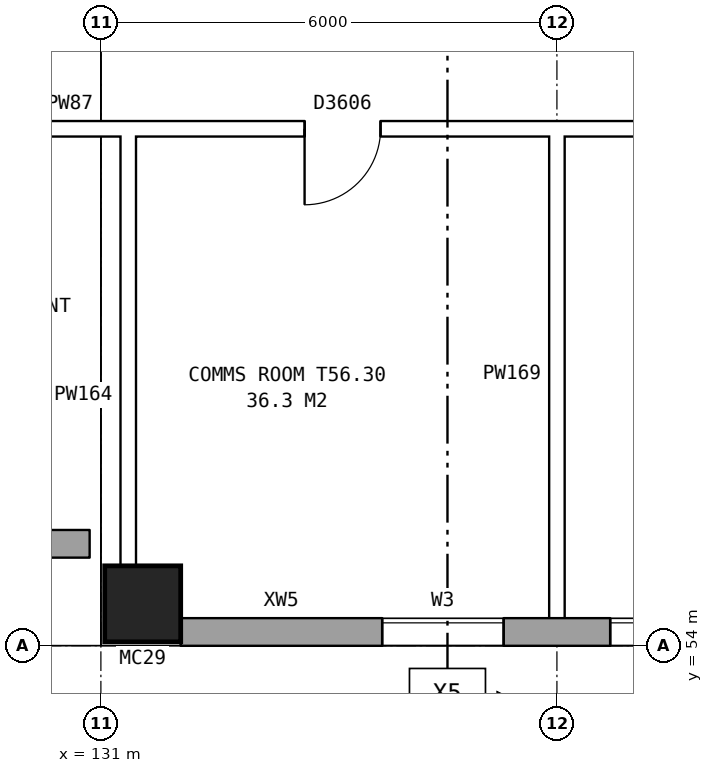
"""IFC4 building model, lengths in metres.
Left out: names, types, materials, properties, quantities, classifications, styles, units other than length and angle.
Written with IfcOpenShell. Run it as: python <this file> out.ifc"""

import sys

from ifc_helpers import new_model, si_unit, direction, frame, frame_2d, origin, origin_2d, place, context, subcontext, project, spatial, rectangle, hollow_rectangle, extrude, element, fill, save


model = new_model("IFC4")
c1 = context("Model", 3, precision=1e-05, world=origin(), true_north=direction((0.0, 1.0)))
c2 = subcontext(c1, "Body", "Model", "MODEL_VIEW")
j1 = project(units=[si_unit("LENGTHUNIT", "METRE"), si_unit("PLANEANGLEUNIT", "RADIAN")], contexts=[c1])
p1 = place(None, origin())
s1 = spatial("IfcSite", under=j1, at=p1, CompositionType="ELEMENT")
p2 = place(p1, origin())
s2 = spatial("IfcBuilding", under=s1, at=p2, CompositionType="ELEMENT")
p3 = place(p2, frame((0.0, 0.0, 198.6)))
s3 = spatial("IfcBuildingStorey", under=s2, at=p3, CompositionType="ELEMENT", Elevation=198.6)
p4 = place(p3, frame((131.55, 54.55, 0.0), z_axis=(0.0, 0.0, 1.0), x_axis=(1.0, 0.0, 0.0)))
e1 = element("IfcColumn", 1, at=p4, inside=s3, PredefinedType="COLUMN", context=c2, shape_type="SweptSolid", body=[
    extrude(hollow_rectangle(XDim=1.0, YDim=1.0, WallThickness=0.055, at=origin_2d()), origin(), (0.0, 0.0, 1.0), 4.2),
])
p5 = place(p3, frame((76.15, 55.34, 0.0), z_axis=(0.0, 0.0, 1.0), x_axis=(1.0, 0.0, 0.0)))
e2 = element("IfcWall", 2, at=p5, inside=s3, PredefinedType="STANDARD", context=c2, shape_type="SweptSolid", body=[
    extrude(rectangle(XDim=54.7, YDim=0.36, at=frame_2d((27.35, 0.0))), origin(), (0.0, 0.0, 1.0), 3.7),
])
p6 = place(p5, frame((1.75, 0.0, 1.5)))
e3 = element("IfcOpeningElement", 3, at=p6, cuts=e2, PredefinedType="OPENING", context=c2, shape_type="SweptSolid", body=[
    extrude(rectangle(XDim=0.6, YDim=1.2, at=frame_2d((0.3, 0.6))), frame((0.0, 0.19, 0.0), z_axis=(0.0, -1.0, 0.0), x_axis=(1.0, 0.0, 0.0)), (0.0, 0.0, 1.0), 0.38),
])
p7 = place(p5, frame((4.206, 0.0, 1.5)))
e4 = element("IfcOpeningElement", 4, at=p7, cuts=e2, PredefinedType="OPENING", context=c2, shape_type="SweptSolid", body=[
    extrude(rectangle(XDim=1.6, YDim=1.2, at=frame_2d((0.8, 0.6))), frame((0.0, 0.19, 0.0), z_axis=(0.0, -1.0, 0.0), x_axis=(1.0, 0.0, 0.0)), (0.0, 0.0, 1.0), 0.38),
])
p8 = place(p5, frame((8.625, 0.0, 1.5)))
e5 = element("IfcOpeningElement", 5, at=p8, cuts=e2, PredefinedType="OPENING", context=c2, shape_type="SweptSolid", body=[
    extrude(rectangle(XDim=0.6, YDim=1.2, at=frame_2d((0.3, 0.6))), frame((0.0, 0.19, 0.0), z_axis=(0.0, -1.0, 0.0), x_axis=(1.0, 0.0, 0.0)), (0.0, 0.0, 1.0), 0.38),
])
p9 = place(p5, frame((11.081, 0.0, 1.5)))
e6 = element("IfcOpeningElement", 6, at=p9, cuts=e2, PredefinedType="OPENING", context=c2, shape_type="SweptSolid", body=[
    extrude(rectangle(XDim=1.6, YDim=1.2, at=frame_2d((0.8, 0.6))), frame((0.0, 0.19, 0.0), z_axis=(0.0, -1.0, 0.0), x_axis=(1.0, 0.0, 0.0)), (0.0, 0.0, 1.0), 0.38),
])
p10 = place(p5, frame((9.525, 0.0, 1.5)))
e7 = element("IfcOpeningElement", 7, at=p10, cuts=e2, PredefinedType="OPENING", context=c2, shape_type="SweptSolid", body=[
    extrude(rectangle(XDim=1.2, YDim=1.2, at=frame_2d((0.6, 0.6))), frame((0.0, 0.19, 0.0), z_axis=(0.0, -1.0, 0.0), x_axis=(1.0, 0.0, 0.0)), (0.0, 0.0, 1.0), 0.38),
])
p11 = place(p5, frame((17.956, 0.0, 1.5)))
e8 = element("IfcOpeningElement", 8, at=p11, cuts=e2, PredefinedType="OPENING", context=c2, shape_type="SweptSolid", body=[
    extrude(rectangle(XDim=1.6, YDim=1.2, at=frame_2d((0.8, 0.6))), frame((0.0, 0.19, 0.0), z_axis=(0.0, -1.0, 0.0), x_axis=(1.0, 0.0, 0.0)), (0.0, 0.0, 1.0), 0.38),
])
p12 = place(p5, frame((22.375, 0.0, 1.5)))
e9 = element("IfcOpeningElement", 9, at=p12, cuts=e2, PredefinedType="OPENING", context=c2, shape_type="SweptSolid", body=[
    extrude(rectangle(XDim=1.6, YDim=1.2, at=frame_2d((0.8, 0.6))), frame((0.0, 0.19, 0.0), z_axis=(0.0, -1.0, 0.0), x_axis=(1.0, 0.0, 0.0)), (0.0, 0.0, 1.0), 0.38),
])
p13 = place(p5, frame((24.831, 0.0, 1.5)))
e10 = element("IfcOpeningElement", 10, at=p13, cuts=e2, PredefinedType="OPENING", context=c2, shape_type="SweptSolid", body=[
    extrude(rectangle(XDim=1.6, YDim=1.2, at=frame_2d((0.8, 0.6))), frame((0.0, 0.19, 0.0), z_axis=(0.0, -1.0, 0.0), x_axis=(1.0, 0.0, 0.0)), (0.0, 0.0, 1.0), 0.38),
])
p14 = place(p5, frame((28.269, 0.0, 1.5)))
e11 = element("IfcOpeningElement", 11, at=p14, cuts=e2, PredefinedType="OPENING", context=c2, shape_type="SweptSolid", body=[
    extrude(rectangle(XDim=1.6, YDim=1.2, at=frame_2d((0.8, 0.6))), frame((0.0, 0.19, 0.0), z_axis=(0.0, -1.0, 0.0), x_axis=(1.0, 0.0, 0.0)), (0.0, 0.0, 1.0), 0.38),
])
p15 = place(p5, frame((26.775, 0.0, 1.5)))
e12 = element("IfcOpeningElement", 12, at=p15, cuts=e2, PredefinedType="OPENING", context=c2, shape_type="SweptSolid", body=[
    extrude(rectangle(XDim=0.9, YDim=1.2, at=frame_2d((0.45, 0.6))), frame((0.0, 0.19, 0.0), z_axis=(0.0, -1.0, 0.0), x_axis=(1.0, 0.0, 0.0)), (0.0, 0.0, 1.0), 0.38),
])
p16 = place(p5, frame((35.144, 0.0, 1.5)))
e13 = element("IfcOpeningElement", 13, at=p16, cuts=e2, PredefinedType="OPENING", context=c2, shape_type="SweptSolid", body=[
    extrude(rectangle(XDim=1.6, YDim=1.2, at=frame_2d((0.8, 0.6))), frame((0.0, 0.19, 0.0), z_axis=(0.0, -1.0, 0.0), x_axis=(1.0, 0.0, 0.0)), (0.0, 0.0, 1.0), 0.38),
])
p17 = place(p5, frame((37.075, 0.0, 1.5)))
e14 = element("IfcOpeningElement", 14, at=p17, cuts=e2, PredefinedType="OPENING", context=c2, shape_type="SweptSolid", body=[
    extrude(rectangle(XDim=0.6, YDim=1.2, at=frame_2d((0.3, 0.6))), frame((0.0, 0.19, 0.0), z_axis=(0.0, -1.0, 0.0), x_axis=(1.0, 0.0, 0.0)), (0.0, 0.0, 1.0), 0.38),
])
p18 = place(p5, frame((42.019, 0.0, 1.5)))
e15 = element("IfcOpeningElement", 15, at=p18, cuts=e2, PredefinedType="OPENING", context=c2, shape_type="SweptSolid", body=[
    extrude(rectangle(XDim=1.6, YDim=1.2, at=frame_2d((0.8, 0.6))), frame((0.0, 0.19, 0.0), z_axis=(0.0, -1.0, 0.0), x_axis=(1.0, 0.0, 0.0)), (0.0, 0.0, 1.0), 0.38),
])
p19 = place(p5, frame((37.975, 0.0, 1.5)))
e16 = element("IfcOpeningElement", 16, at=p19, cuts=e2, PredefinedType="OPENING", context=c2, shape_type="SweptSolid", body=[
    extrude(rectangle(XDim=1.2, YDim=1.2, at=frame_2d((0.6, 0.6))), frame((0.0, 0.19, 0.0), z_axis=(0.0, -1.0, 0.0), x_axis=(1.0, 0.0, 0.0)), (0.0, 0.0, 1.0), 0.38),
])
p20 = place(p5, frame((48.894, 0.0, 1.5)))
e17 = element("IfcOpeningElement", 17, at=p20, cuts=e2, PredefinedType="OPENING", context=c2, shape_type="SweptSolid", body=[
    extrude(rectangle(XDim=1.6, YDim=1.2, at=frame_2d((0.8, 0.6))), frame((0.0, 0.19, 0.0), z_axis=(0.0, -1.0, 0.0), x_axis=(1.0, 0.0, 0.0)), (0.0, 0.0, 1.0), 0.38),
])
p21 = place(p5, frame((50.825, 0.0, 1.5)))
e18 = element("IfcOpeningElement", 18, at=p21, cuts=e2, PredefinedType="OPENING", context=c2, shape_type="SweptSolid", body=[
    extrude(rectangle(XDim=0.6, YDim=1.2, at=frame_2d((0.3, 0.6))), frame((0.0, 0.19, 0.0), z_axis=(0.0, -1.0, 0.0), x_axis=(1.0, 0.0, 0.0)), (0.0, 0.0, 1.0), 0.38),
])
p22 = place(p5, frame((2.65, 0.0, 1.5)))
e19 = element("IfcOpeningElement", 19, at=p22, cuts=e2, PredefinedType="OPENING", context=c2, shape_type="SweptSolid", body=[
    extrude(rectangle(XDim=1.2, YDim=1.2, at=frame_2d((0.6, 0.6))), frame((0.0, 0.19, 0.0), z_axis=(0.0, -1.0, 0.0), x_axis=(1.0, 0.0, 0.0)), (0.0, 0.0, 1.0), 0.38),
])
p23 = place(p5, frame((13.025, 0.0, 1.5)))
e20 = element("IfcOpeningElement", 20, at=p23, cuts=e2, PredefinedType="OPENING", context=c2, shape_type="SweptSolid", body=[
    extrude(rectangle(XDim=0.6, YDim=1.2, at=frame_2d((0.3, 0.6))), frame((0.0, 0.19, 0.0), z_axis=(0.0, -1.0, 0.0), x_axis=(1.0, 0.0, 0.0)), (0.0, 0.0, 1.0), 0.38),
])
p24 = place(p5, frame((15.475, 0.0, 1.5)))
e21 = element("IfcOpeningElement", 21, at=p24, cuts=e2, PredefinedType="OPENING", context=c2, shape_type="SweptSolid", body=[
    extrude(rectangle(XDim=1.6, YDim=1.2, at=frame_2d((0.8, 0.6))), frame((0.0, 0.19, 0.0), z_axis=(0.0, -1.0, 0.0), x_axis=(1.0, 0.0, 0.0)), (0.0, 0.0, 1.0), 0.38),
])
p25 = place(p5, frame((30.175, 0.0, 1.5)))
e22 = element("IfcOpeningElement", 22, at=p25, cuts=e2, PredefinedType="OPENING", context=c2, shape_type="SweptSolid", body=[
    extrude(rectangle(XDim=1.6, YDim=1.2, at=frame_2d((0.8, 0.6))), frame((0.0, 0.19, 0.0), z_axis=(0.0, -1.0, 0.0), x_axis=(1.0, 0.0, 0.0)), (0.0, 0.0, 1.0), 0.38),
])
p26 = place(p5, frame((41.075, 0.0, 1.5)))
e23 = element("IfcOpeningElement", 23, at=p26, cuts=e2, PredefinedType="OPENING", context=c2, shape_type="SweptSolid", body=[
    extrude(rectangle(XDim=0.6, YDim=1.2, at=frame_2d((0.3, 0.6))), frame((0.0, 0.19, 0.0), z_axis=(0.0, -1.0, 0.0), x_axis=(1.0, 0.0, 0.0)), (0.0, 0.0, 1.0), 0.38),
])
p27 = place(p5, frame((43.925, 0.0, 1.5)))
e24 = element("IfcOpeningElement", 24, at=p27, cuts=e2, PredefinedType="OPENING", context=c2, shape_type="SweptSolid", body=[
    extrude(rectangle(XDim=1.6, YDim=1.2, at=frame_2d((0.8, 0.6))), frame((0.0, 0.19, 0.0), z_axis=(0.0, -1.0, 0.0), x_axis=(1.0, 0.0, 0.0)), (0.0, 0.0, 1.0), 0.38),
])
p28 = place(p5, frame((51.725, 0.0, 1.5)))
e25 = element("IfcOpeningElement", 25, at=p28, cuts=e2, PredefinedType="OPENING", context=c2, shape_type="SweptSolid", body=[
    extrude(rectangle(XDim=1.2, YDim=1.2, at=frame_2d((0.6, 0.6))), frame((0.0, 0.19, 0.0), z_axis=(0.0, -1.0, 0.0), x_axis=(1.0, 0.0, 0.0)), (0.0, 0.0, 1.0), 0.38),
])
p29 = place(p3, frame((132.05, 54.18, 0.0), z_axis=(0.0, 0.0, 1.0), x_axis=(1.0, 0.0, 0.0)))
e26 = element("IfcWall", 26, at=p29, inside=s3, PredefinedType="STANDARD", context=c2, shape_type="SweptSolid", body=[
    extrude(rectangle(XDim=33.875, YDim=0.36, at=frame_2d((16.938, 0.0))), origin(), (0.0, 0.0, 1.0), 3.7),
])
p30 = place(p29, frame((2.65, 0.0, 1.5)))
e27 = element("IfcOpeningElement", 27, at=p30, cuts=e26, PredefinedType="OPENING", context=c2, shape_type="SweptSolid", body=[
    extrude(rectangle(XDim=1.6, YDim=1.2, at=frame_2d((0.8, 0.6))), frame((0.0, 0.19, 0.0), z_axis=(0.0, -1.0, 0.0), x_axis=(1.0, 0.0, 0.0)), (0.0, 0.0, 1.0), 0.38),
])
p31 = place(p29, frame((5.65, 0.0, 1.5)))
e28 = element("IfcOpeningElement", 28, at=p31, cuts=e26, PredefinedType="OPENING", context=c2, shape_type="SweptSolid", body=[
    extrude(rectangle(XDim=1.6, YDim=1.2, at=frame_2d((0.8, 0.6))), frame((0.0, 0.19, 0.0), z_axis=(0.0, -1.0, 0.0), x_axis=(1.0, 0.0, 0.0)), (0.0, 0.0, 1.0), 0.38),
])
p32 = place(p29, frame((8.65, 0.0, 1.5)))
e29 = element("IfcOpeningElement", 29, at=p32, cuts=e26, PredefinedType="OPENING", context=c2, shape_type="SweptSolid", body=[
    extrude(rectangle(XDim=1.6, YDim=1.2, at=frame_2d((0.8, 0.6))), frame((0.0, 0.19, 0.0), z_axis=(0.0, -1.0, 0.0), x_axis=(1.0, 0.0, 0.0)), (0.0, 0.0, 1.0), 0.38),
])
p33 = place(p29, frame((11.65, 0.0, 1.5)))
e30 = element("IfcOpeningElement", 30, at=p33, cuts=e26, PredefinedType="OPENING", context=c2, shape_type="SweptSolid", body=[
    extrude(rectangle(XDim=1.6, YDim=1.2, at=frame_2d((0.8, 0.6))), frame((0.0, 0.19, 0.0), z_axis=(0.0, -1.0, 0.0), x_axis=(1.0, 0.0, 0.0)), (0.0, 0.0, 1.0), 0.38),
])
p34 = place(p29, frame((14.65, 0.0, 1.5)))
e31 = element("IfcOpeningElement", 31, at=p34, cuts=e26, PredefinedType="OPENING", context=c2, shape_type="SweptSolid", body=[
    extrude(rectangle(XDim=1.6, YDim=1.2, at=frame_2d((0.8, 0.6))), frame((0.0, 0.19, 0.0), z_axis=(0.0, -1.0, 0.0), x_axis=(1.0, 0.0, 0.0)), (0.0, 0.0, 1.0), 0.38),
])
p35 = place(p29, frame((17.65, 0.0, 1.5)))
e32 = element("IfcOpeningElement", 32, at=p35, cuts=e26, PredefinedType="OPENING", context=c2, shape_type="SweptSolid", body=[
    extrude(rectangle(XDim=1.6, YDim=1.2, at=frame_2d((0.8, 0.6))), frame((0.0, 0.19, 0.0), z_axis=(0.0, -1.0, 0.0), x_axis=(1.0, 0.0, 0.0)), (0.0, 0.0, 1.0), 0.38),
])
p36 = place(p29, frame((20.65, 0.0, 1.5)))
e33 = element("IfcOpeningElement", 33, at=p36, cuts=e26, PredefinedType="OPENING", context=c2, shape_type="SweptSolid", body=[
    extrude(rectangle(XDim=1.6, YDim=1.2, at=frame_2d((0.8, 0.6))), frame((0.0, 0.19, 0.0), z_axis=(0.0, -1.0, 0.0), x_axis=(1.0, 0.0, 0.0)), (0.0, 0.0, 1.0), 0.38),
])
p37 = place(p29, frame((23.65, 0.0, 1.5)))
e34 = element("IfcOpeningElement", 34, at=p37, cuts=e26, PredefinedType="OPENING", context=c2, shape_type="SweptSolid", body=[
    extrude(rectangle(XDim=1.6, YDim=1.2, at=frame_2d((0.8, 0.6))), frame((0.0, 0.19, 0.0), z_axis=(0.0, -1.0, 0.0), x_axis=(1.0, 0.0, 0.0)), (0.0, 0.0, 1.0), 0.38),
])
p38 = place(p29, frame((26.65, 0.0, 1.5)))
e35 = element("IfcOpeningElement", 35, at=p38, cuts=e26, PredefinedType="OPENING", context=c2, shape_type="SweptSolid", body=[
    extrude(rectangle(XDim=1.6, YDim=1.2, at=frame_2d((0.8, 0.6))), frame((0.0, 0.19, 0.0), z_axis=(0.0, -1.0, 0.0), x_axis=(1.0, 0.0, 0.0)), (0.0, 0.0, 1.0), 0.38),
])
p39 = place(p29, frame((29.65, 0.0, 1.5)))
e36 = element("IfcOpeningElement", 36, at=p39, cuts=e26, PredefinedType="OPENING", context=c2, shape_type="SweptSolid", body=[
    extrude(rectangle(XDim=1.6, YDim=1.2, at=frame_2d((0.8, 0.6))), frame((0.0, 0.19, 0.0), z_axis=(0.0, -1.0, 0.0), x_axis=(1.0, 0.0, 0.0)), (0.0, 0.0, 1.0), 0.38),
])
p40 = place(p3, frame((32.24, 60.8, 0.0), z_axis=(0.0, 0.0, 1.0), x_axis=(1.0, 0.0, 0.0)))
e37 = element("IfcWall", 37, at=p40, inside=s3, PredefinedType="PARTITIONING", context=c2, shape_type="SweptSolid", body=[
    extrude(rectangle(XDim=136.52, YDim=0.2, at=frame_2d((68.26, 0.0))), origin(), (0.0, 0.0, 1.0), 3.7),
])
p41 = place(p40, frame((1.94, 0.0, 0.0)))
e38 = element("IfcOpeningElement", 38, at=p41, cuts=e37, PredefinedType="OPENING", context=c2, shape_type="SweptSolid", body=[
    extrude(rectangle(XDim=1.0, YDim=2.1, at=frame_2d((0.5, 1.05))), frame((0.0, 0.11, 0.0), z_axis=(0.0, -1.0, 0.0), x_axis=(1.0, 0.0, 0.0)), (0.0, 0.0, 1.0), 0.22),
])
p42 = place(p40, frame((8.76, 0.0, 0.0)))
e39 = element("IfcOpeningElement", 39, at=p42, cuts=e37, PredefinedType="OPENING", context=c2, shape_type="SweptSolid", body=[
    extrude(rectangle(XDim=1.0, YDim=2.1, at=frame_2d((0.5, 1.05))), frame((0.0, 0.11, 0.0), z_axis=(0.0, -1.0, 0.0), x_axis=(1.0, 0.0, 0.0)), (0.0, 0.0, 1.0), 0.22),
])
p43 = place(p40, frame((20.46, 0.0, 0.0)))
e40 = element("IfcOpeningElement", 40, at=p43, cuts=e37, PredefinedType="OPENING", context=c2, shape_type="SweptSolid", body=[
    extrude(rectangle(XDim=1.0, YDim=2.1, at=frame_2d((0.5, 1.05))), frame((0.0, 0.11, 0.0), z_axis=(0.0, -1.0, 0.0), x_axis=(1.0, 0.0, 0.0)), (0.0, 0.0, 1.0), 0.22),
])
p44 = place(p40, frame((30.06, 0.0, 0.0)))
e41 = element("IfcOpeningElement", 41, at=p44, cuts=e37, PredefinedType="OPENING", context=c2, shape_type="SweptSolid", body=[
    extrude(rectangle(XDim=1.0, YDim=2.1, at=frame_2d((0.5, 1.05))), frame((0.0, 0.11, 0.0), z_axis=(0.0, -1.0, 0.0), x_axis=(1.0, 0.0, 0.0)), (0.0, 0.0, 1.0), 0.22),
])
p45 = place(p40, frame((40.08, 0.0, 0.0)))
e42 = element("IfcOpeningElement", 42, at=p45, cuts=e37, PredefinedType="OPENING", context=c2, shape_type="SweptSolid", body=[
    extrude(rectangle(XDim=1.0, YDim=2.1, at=frame_2d((0.5, 1.05))), frame((0.0, 0.11, 0.0), z_axis=(0.0, -1.0, 0.0), x_axis=(1.0, 0.0, 0.0)), (0.0, 0.0, 1.0), 0.22),
])
p46 = place(p40, frame((46.517, 0.0, 0.0)))
e43 = element("IfcOpeningElement", 43, at=p46, cuts=e37, PredefinedType="OPENING", context=c2, shape_type="SweptSolid", body=[
    extrude(rectangle(XDim=1.0, YDim=2.1, at=frame_2d((0.5, 1.05))), frame((0.0, 0.11, 0.0), z_axis=(0.0, -1.0, 0.0), x_axis=(1.0, 0.0, 0.0)), (0.0, 0.0, 1.0), 0.22),
])
p47 = place(p40, frame((57.01, 0.0, 0.0)))
e44 = element("IfcOpeningElement", 44, at=p47, cuts=e37, PredefinedType="OPENING", context=c2, shape_type="SweptSolid", body=[
    extrude(rectangle(XDim=1.0, YDim=2.1, at=frame_2d((0.5, 1.05))), frame((0.0, 0.11, 0.0), z_axis=(0.0, -1.0, 0.0), x_axis=(1.0, 0.0, 0.0)), (0.0, 0.0, 1.0), 0.22),
])
p48 = place(p40, frame((70.76, 0.0, 0.0)))
e45 = element("IfcOpeningElement", 45, at=p48, cuts=e37, PredefinedType="OPENING", context=c2, shape_type="SweptSolid", body=[
    extrude(rectangle(XDim=1.0, YDim=2.1, at=frame_2d((0.5, 1.05))), frame((0.0, 0.11, 0.0), z_axis=(0.0, -1.0, 0.0), x_axis=(1.0, 0.0, 0.0)), (0.0, 0.0, 1.0), 0.22),
])
p49 = place(p40, frame((84.51, 0.0, 0.0)))
e46 = element("IfcOpeningElement", 46, at=p49, cuts=e37, PredefinedType="OPENING", context=c2, shape_type="SweptSolid", body=[
    extrude(rectangle(XDim=1.0, YDim=2.1, at=frame_2d((0.5, 1.05))), frame((0.0, 0.11, 0.0), z_axis=(0.0, -1.0, 0.0), x_axis=(1.0, 0.0, 0.0)), (0.0, 0.0, 1.0), 0.22),
])
p50 = place(p40, frame((95.003, 0.0, 0.0)))
e47 = element("IfcOpeningElement", 47, at=p50, cuts=e37, PredefinedType="OPENING", context=c2, shape_type="SweptSolid", body=[
    extrude(rectangle(XDim=1.0, YDim=2.1, at=frame_2d((0.5, 1.05))), frame((0.0, 0.11, 0.0), z_axis=(0.0, -1.0, 0.0), x_axis=(1.0, 0.0, 0.0)), (0.0, 0.0, 1.0), 0.22),
])
p51 = place(p40, frame((101.44, 0.0, 0.0)))
e48 = element("IfcOpeningElement", 48, at=p51, cuts=e37, PredefinedType="OPENING", context=c2, shape_type="SweptSolid", body=[
    extrude(rectangle(XDim=1.0, YDim=2.1, at=frame_2d((0.5, 1.05))), frame((0.0, 0.11, 0.0), z_axis=(0.0, -1.0, 0.0), x_axis=(1.0, 0.0, 0.0)), (0.0, 0.0, 1.0), 0.22),
])
p52 = place(p40, frame((111.56, 0.0, 0.0)))
e49 = element("IfcOpeningElement", 49, at=p52, cuts=e37, PredefinedType="OPENING", context=c2, shape_type="SweptSolid", body=[
    extrude(rectangle(XDim=1.0, YDim=2.1, at=frame_2d((0.5, 1.05))), frame((0.0, 0.11, 0.0), z_axis=(0.0, -1.0, 0.0), x_axis=(1.0, 0.0, 0.0)), (0.0, 0.0, 1.0), 0.22),
])
p53 = place(p40, frame((123.56, 0.0, 0.0)))
e50 = element("IfcOpeningElement", 50, at=p53, cuts=e37, PredefinedType="OPENING", context=c2, shape_type="SweptSolid", body=[
    extrude(rectangle(XDim=1.0, YDim=2.1, at=frame_2d((0.5, 1.05))), frame((0.0, 0.11, 0.0), z_axis=(0.0, -1.0, 0.0), x_axis=(1.0, 0.0, 0.0)), (0.0, 0.0, 1.0), 0.22),
])
p54 = place(p40, frame((132.08, 0.0, 0.0)))
e51 = element("IfcOpeningElement", 51, at=p54, cuts=e37, PredefinedType="OPENING", context=c2, shape_type="SweptSolid", body=[
    extrude(rectangle(XDim=1.0, YDim=2.1, at=frame_2d((0.5, 1.05))), frame((0.0, 0.11, 0.0), z_axis=(0.0, -1.0, 0.0), x_axis=(1.0, 0.0, 0.0)), (0.0, 0.0, 1.0), 0.22),
])
for number, where, z_axis, x_axis in (
    (52, (131.36, 54.24, 0.0), (0.0, 0.0, 1.0), (0.0, 1.0, 0.0)),
    (53, (137.0, 54.24, 0.0), (0.0, 0.0, 1.0), (0.0, 1.0, 0.0)),
):
    element("IfcWall", number, at=place(p3, frame(where, z_axis=z_axis, x_axis=x_axis)), inside=s3, PredefinedType="PARTITIONING", context=c2, shape_type="SweptSolid", body=[
        extrude(rectangle(XDim=6.66, YDim=0.2, at=frame_2d((3.33, 0.0))), origin(), (0.0, 0.0, 1.0), 3.7),
    ])
p55 = place(p30, origin())
e54 = element("IfcWindow", 54, at=p55, inside=s3, PartitioningType="DOUBLE_PANEL_HORIZONTAL", PredefinedType="WINDOW", context=c2, shape_type="SweptSolid", body=[
    extrude(rectangle(XDim=1.6, YDim=1.2, at=frame_2d((0.8, 0.6))), frame((0.0, 0.15, 0.0), z_axis=(0.0, -1.0, 0.0), x_axis=(1.0, 0.0, 0.0)), (0.0, 0.0, 1.0), 0.06),
])
fill(e27, e54)
p56 = place(p31, origin())
e55 = element("IfcWindow", 55, at=p56, inside=s3, PartitioningType="DOUBLE_PANEL_HORIZONTAL", PredefinedType="WINDOW", context=c2, shape_type="SweptSolid", body=[
    extrude(rectangle(XDim=1.6, YDim=1.2, at=frame_2d((0.8, 0.6))), frame((0.0, 0.15, 0.0), z_axis=(0.0, -1.0, 0.0), x_axis=(1.0, 0.0, 0.0)), (0.0, 0.0, 1.0), 0.06),
])
fill(e28, e55)
p57 = place(p51, frame((1.0, 0.0, 0.0), z_axis=(0.0, 0.0, 1.0), x_axis=(-1.0, 0.0, 0.0)))
e56 = element("IfcDoor", 56, at=p57, inside=s3, OperationType="SINGLE_SWING_RIGHT", PredefinedType="DOOR", context=c2, shape_type="SweptSolid", body=[
    extrude(rectangle(XDim=1.0, YDim=2.1, at=frame_2d((0.5, 1.05))), frame((0.0, 0.025, 0.0), z_axis=(0.0, -1.0, 0.0), x_axis=(1.0, 0.0, 0.0)), (0.0, 0.0, 1.0), 0.05),
])
fill(e48, e56)
save(model, sys.argv[1])
